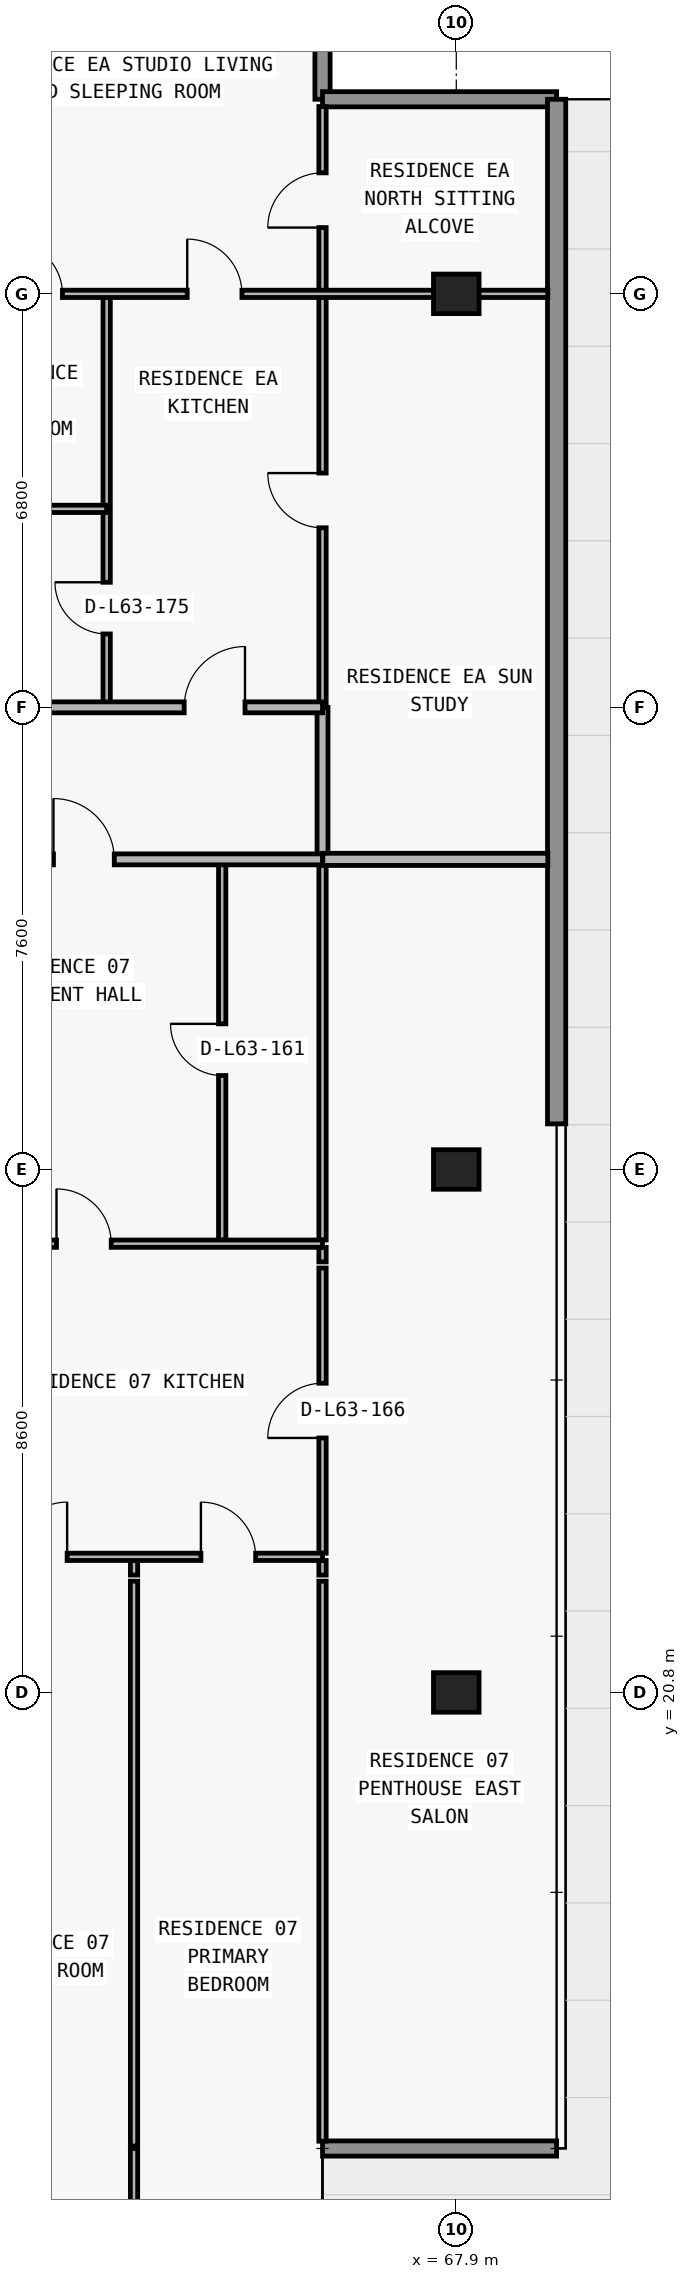
"""IFC4 building model, lengths in metres.
Left out: names, types, materials, properties, quantities, classifications, styles, units other than length and angle.
Written with IfcOpenShell. Run it as: python <this file> out.ifc"""

import sys

from ifc_helpers import new_model, si_unit, direction, frame, frame_2d, origin, origin_2d, place, context, subcontext, project, spatial, rectangle, extrude, element, fill, save


model = new_model("IFC4")
c1 = context("Model", 3, precision=1e-05, world=origin(), true_north=direction((0.0, 1.0)))
c2 = subcontext(c1, "Body", "Model", "MODEL_VIEW")
j1 = project(units=[si_unit("LENGTHUNIT", "METRE"), si_unit("PLANEANGLEUNIT", "RADIAN")], contexts=[c1])
p1 = place(None, origin())
s1 = spatial("IfcSite", under=j1, at=p1, CompositionType="ELEMENT")
p2 = place(p1, origin())
s2 = spatial("IfcBuilding", under=s1, at=p2, CompositionType="ELEMENT")
p3 = place(p2, frame((0.0, 0.0, 226.5)))
s3 = spatial("IfcBuildingStorey", under=s2, at=p3, CompositionType="ELEMENT", Elevation=226.5)
for number, where, z_axis, x_axis in (
    (1, (67.9, 20.8, 0.0), (0.0, 0.0, 1.0), (1.0, 0.0, 0.0)),
    (2, (67.9, 29.4, 0.0), (0.0, 0.0, 1.0), (1.0, 0.0, 0.0)),
    (3, (67.9, 43.8, 0.0), (0.0, 0.0, 1.0), (1.0, 0.0, 0.0)),
):
    element("IfcColumn", number, at=place(p3, frame(where, z_axis=z_axis, x_axis=x_axis)), inside=s3, PredefinedType="COLUMN", context=c2, shape_type="SweptSolid", body=[
        extrude(rectangle(XDim=0.75, YDim=0.65, at=origin_2d()), origin(), (0.0, 0.0, 1.0), 3.05),
    ])
p4 = place(p3, frame((65.7, 13.3, 0.0), z_axis=(0.0, 0.0, 1.0), x_axis=(1.0, 0.0, 0.0)))
e4 = element("IfcWall", 4, at=p4, inside=s3, PredefinedType="ELEMENTEDWALL", context=c2, shape_type="SweptSolid", body=[
    extrude(rectangle(XDim=3.85, YDim=0.25, at=frame_2d((1.925, 0.0))), origin(), (0.0, 0.0, 1.0), 3.05),
])
p5 = place(p3, frame((65.7, 50.45, 0.0), z_axis=(0.0, 0.0, 1.0), x_axis=(0.0, -1.0, 0.0)))
e5 = element("IfcWall", 5, at=p5, inside=s3, PredefinedType="ELEMENTEDWALL", context=c2, shape_type="SweptSolid", body=[
    extrude(rectangle(XDim=3.45, YDim=0.25, at=frame_2d((1.725, 0.0))), origin(), (0.0, 0.0, 1.0), 3.05),
])
p6 = place(p3, frame((65.7, 47.0, 0.0), z_axis=(0.0, 0.0, 1.0), x_axis=(1.0, 0.0, 0.0)))
e6 = element("IfcWall", 6, at=p6, inside=s3, PredefinedType="ELEMENTEDWALL", context=c2, shape_type="SweptSolid", body=[
    extrude(rectangle(XDim=3.85, YDim=0.25, at=frame_2d((1.925, 0.0))), origin(), (0.0, 0.0, 1.0), 3.05),
])
p7 = place(p3, frame((69.55, 47.0, 0.0), z_axis=(0.0, 0.0, 1.0), x_axis=(0.0, -1.0, 0.0)))
e7 = element("IfcWall", 7, at=p7, inside=s3, PredefinedType="STANDARD", context=c2, shape_type="SweptSolid", body=[
    extrude(rectangle(XDim=16.85, YDim=0.3, at=frame_2d((8.425, 0.0))), origin(), (0.0, 0.0, 1.0), 3.05),
])
p8 = place(p3, frame((62.15, 37.0, 0.0), z_axis=(0.0, 0.0, 1.0), x_axis=(0.0, 1.0, 0.0)))
e8 = element("IfcWall", 8, at=p8, inside=s3, PredefinedType="PARTITIONING", context=c2, shape_type="SweptSolid", body=[
    extrude(rectangle(XDim=6.8, YDim=0.12, at=frame_2d((3.4, 0.0))), origin(), (0.0, 0.0, 1.0), 3.05),
])
p9 = place(p8, frame((1.207, 0.0, 0.0)))
e9 = element("IfcOpeningElement", 9, at=p9, cuts=e8, PredefinedType="OPENING", context=c2, shape_type="SweptSolid", body=[
    extrude(rectangle(XDim=0.85, YDim=2.1, at=frame_2d((0.425, 1.05))), frame((0.0, 0.07, 0.0), z_axis=(0.0, -1.0, 0.0), x_axis=(1.0, 0.0, 0.0)), (0.0, 0.0, 1.0), 0.14),
])
p10 = place(p3, frame((62.6, 9.995, 0.0), z_axis=(0.0, 0.0, 1.0), x_axis=(0.0, 1.0, 0.0)))
e10 = element("IfcWall", 10, at=p10, inside=s3, PredefinedType="PARTITIONING", context=c2, shape_type="SweptSolid", body=[
    extrude(rectangle(XDim=3.305, YDim=0.12, at=frame_2d((1.652, 0.0))), origin(), (0.0, 0.0, 1.0), 3.05),
])
p11 = place(p3, frame((62.6, 13.34, 0.0), z_axis=(0.0, 0.0, 1.0), x_axis=(0.0, 1.0, 0.0)))
e11 = element("IfcWall", 11, at=p11, inside=s3, PredefinedType="PARTITIONING", context=c2, shape_type="SweptSolid", body=[
    extrude(rectangle(XDim=9.29, YDim=0.12, at=frame_2d((4.645, 0.0))), origin(), (0.0, 0.0, 1.0), 3.05),
])
p12 = place(p3, frame((62.6, 22.73, 0.0), z_axis=(0.0, 0.0, 1.0), x_axis=(0.0, 1.0, 0.0)))
e12 = element("IfcWall", 12, at=p12, inside=s3, PredefinedType="PARTITIONING", context=c2, shape_type="SweptSolid", body=[
    extrude(rectangle(XDim=0.24, YDim=0.12, at=frame_2d((0.12, 0.0))), origin(), (0.0, 0.0, 1.0), 3.05),
])
p13 = place(p3, frame((64.05, 28.24, 0.0), z_axis=(0.0, 0.0, 1.0), x_axis=(0.0, 1.0, 0.0)))
e13 = element("IfcWall", 13, at=p13, inside=s3, PredefinedType="PARTITIONING", context=c2, shape_type="SweptSolid", body=[
    extrude(rectangle(XDim=6.26, YDim=0.12, at=frame_2d((3.13, 0.0))), origin(), (0.0, 0.0, 1.0), 3.05),
])
p14 = place(p13, frame((2.705, 0.0, 0.0)))
e14 = element("IfcOpeningElement", 14, at=p14, cuts=e13, PredefinedType="OPENING", context=c2, shape_type="SweptSolid", body=[
    extrude(rectangle(XDim=0.85, YDim=2.1, at=frame_2d((0.425, 1.05))), frame((0.0, 0.07, 0.0), z_axis=(0.0, -1.0, 0.0), x_axis=(1.0, 0.0, 0.0)), (0.0, 0.0, 1.0), 0.14),
])
p15 = place(p3, frame((65.7, 13.42, 0.0), z_axis=(0.0, 0.0, 1.0), x_axis=(0.0, 1.0, 0.0)))
e15 = element("IfcWall", 15, at=p15, inside=s3, PredefinedType="PARTITIONING", context=c2, shape_type="SweptSolid", body=[
    extrude(rectangle(XDim=9.21, YDim=0.12, at=frame_2d((4.605, 0.0))), origin(), (0.0, 0.0, 1.0), 3.05),
])
p16 = place(p3, frame((65.7, 22.73, 0.0), z_axis=(0.0, 0.0, 1.0), x_axis=(0.0, 1.0, 0.0)))
e16 = element("IfcWall", 16, at=p16, inside=s3, PredefinedType="PARTITIONING", context=c2, shape_type="SweptSolid", body=[
    extrude(rectangle(XDim=0.24, YDim=0.12, at=frame_2d((0.12, 0.0))), origin(), (0.0, 0.0, 1.0), 3.05),
])
p17 = place(p3, frame((65.7, 23.09, 0.0), z_axis=(0.0, 0.0, 1.0), x_axis=(0.0, 1.0, 0.0)))
e17 = element("IfcWall", 17, at=p17, inside=s3, PredefinedType="PARTITIONING", context=c2, shape_type="SweptSolid", body=[
    extrude(rectangle(XDim=4.69, YDim=0.12, at=frame_2d((2.345, 0.0))), origin(), (0.0, 0.0, 1.0), 3.05),
])
p18 = place(p17, frame((1.895, 0.0, 0.0)))
e18 = element("IfcOpeningElement", 18, at=p18, cuts=e17, PredefinedType="OPENING", context=c2, shape_type="SweptSolid", body=[
    extrude(rectangle(XDim=0.9, YDim=2.15, at=frame_2d((0.45, 1.075))), frame((0.0, 0.07, 0.0), z_axis=(0.0, -1.0, 0.0), x_axis=(1.0, 0.0, 0.0)), (0.0, 0.0, 1.0), 0.14),
])
p19 = place(p3, frame((65.7, 27.88, 0.0), z_axis=(0.0, 0.0, 1.0), x_axis=(0.0, 1.0, 0.0)))
e19 = element("IfcWall", 19, at=p19, inside=s3, PredefinedType="PARTITIONING", context=c2, shape_type="SweptSolid", body=[
    extrude(rectangle(XDim=0.24, YDim=0.12, at=frame_2d((0.12, 0.0))), origin(), (0.0, 0.0, 1.0), 3.05),
])
p20 = place(p3, frame((65.7, 28.24, 0.0), z_axis=(0.0, 0.0, 1.0), x_axis=(0.0, 1.0, 0.0)))
e20 = element("IfcWall", 20, at=p20, inside=s3, PredefinedType="PARTITIONING", context=c2, shape_type="SweptSolid", body=[
    extrude(rectangle(XDim=6.26, YDim=0.12, at=frame_2d((3.13, 0.0))), origin(), (0.0, 0.0, 1.0), 3.05),
])
p21 = place(p3, frame((65.7, 34.505, 0.0), z_axis=(0.0, 0.0, 1.0), x_axis=(0.0, 1.0, 0.0)))
e21 = element("IfcWall", 21, at=p21, inside=s3, PredefinedType="PARTITIONING", context=c2, shape_type="SweptSolid", body=[
    extrude(rectangle(XDim=2.495, YDim=0.18, at=frame_2d((1.248, 0.0))), origin(), (0.0, 0.0, 1.0), 3.05),
])
p22 = place(p3, frame((65.7, 37.005, 0.0), z_axis=(0.0, 0.0, 1.0), x_axis=(0.0, 1.0, 0.0)))
e22 = element("IfcWall", 22, at=p22, inside=s3, PredefinedType="PARTITIONING", context=c2, shape_type="SweptSolid", body=[
    extrude(rectangle(XDim=9.875, YDim=0.12, at=frame_2d((4.938, 0.0))), origin(), (0.0, 0.0, 1.0), 3.05),
])
p23 = place(p22, frame((2.948, 0.0, 0.0)))
e23 = element("IfcOpeningElement", 23, at=p23, cuts=e22, PredefinedType="OPENING", context=c2, shape_type="SweptSolid", body=[
    extrude(rectangle(XDim=0.9, YDim=2.15, at=frame_2d((0.45, 1.075))), frame((0.0, 0.07, 0.0), z_axis=(0.0, -1.0, 0.0), x_axis=(1.0, 0.0, 0.0)), (0.0, 0.0, 1.0), 0.14),
])
p24 = place(p22, frame((7.885, 0.0, 0.0)))
e24 = element("IfcOpeningElement", 24, at=p24, cuts=e22, PredefinedType="OPENING", context=c2, shape_type="SweptSolid", body=[
    extrude(rectangle(XDim=0.9, YDim=2.15, at=frame_2d((0.45, 1.075))), frame((0.0, 0.07, 0.0), z_axis=(0.0, -1.0, 0.0), x_axis=(1.0, 0.0, 0.0)), (0.0, 0.0, 1.0), 0.14),
])
p25 = place(p3, frame((59.5, 23.03, 0.0), z_axis=(0.0, 0.0, 1.0), x_axis=(1.0, 0.0, 0.0)))
e25 = element("IfcWall", 25, at=p25, inside=s3, PredefinedType="PARTITIONING", context=c2, shape_type="SweptSolid", body=[
    extrude(rectangle(XDim=6.2, YDim=0.12, at=frame_2d((3.1, 0.0))), origin(), (0.0, 0.0, 1.0), 3.05),
])
p26 = place(p25, frame((1.1, 0.0, 0.0)))
e26 = element("IfcOpeningElement", 26, at=p26, cuts=e25, PredefinedType="OPENING", context=c2, shape_type="SweptSolid", body=[
    extrude(rectangle(XDim=0.9, YDim=2.15, at=frame_2d((0.45, 1.075))), frame((0.0, 0.07, 0.0), z_axis=(0.0, -1.0, 0.0), x_axis=(1.0, 0.0, 0.0)), (0.0, 0.0, 1.0), 0.14),
])
p27 = place(p25, frame((4.2, 0.0, 0.0)))
e27 = element("IfcOpeningElement", 27, at=p27, cuts=e25, PredefinedType="OPENING", context=c2, shape_type="SweptSolid", body=[
    extrude(rectangle(XDim=0.9, YDim=2.15, at=frame_2d((0.45, 1.075))), frame((0.0, 0.07, 0.0), z_axis=(0.0, -1.0, 0.0), x_axis=(1.0, 0.0, 0.0)), (0.0, 0.0, 1.0), 0.14),
])
p28 = place(p3, frame((59.5, 28.18, 0.0), z_axis=(0.0, 0.0, 1.0), x_axis=(1.0, 0.0, 0.0)))
e28 = element("IfcWall", 28, at=p28, inside=s3, PredefinedType="PARTITIONING", context=c2, shape_type="SweptSolid", body=[
    extrude(rectangle(XDim=6.2, YDim=0.12, at=frame_2d((3.1, 0.0))), origin(), (0.0, 0.0, 1.0), 3.05),
])
p29 = place(p28, frame((1.825, 0.0, 0.0)))
e29 = element("IfcOpeningElement", 29, at=p29, cuts=e28, PredefinedType="OPENING", context=c2, shape_type="SweptSolid", body=[
    extrude(rectangle(XDim=0.9, YDim=2.15, at=frame_2d((0.45, 1.075))), frame((0.0, 0.07, 0.0), z_axis=(0.0, -1.0, 0.0), x_axis=(1.0, 0.0, 0.0)), (0.0, 0.0, 1.0), 0.14),
])
p30 = place(p3, frame((39.28, 34.5, 0.0), z_axis=(0.0, 0.0, 1.0), x_axis=(1.0, 0.0, 0.0)))
e30 = element("IfcWall", 30, at=p30, inside=s3, PredefinedType="PARTITIONING", context=c2, shape_type="SweptSolid", body=[
    extrude(rectangle(XDim=26.42, YDim=0.18, at=frame_2d((13.21, 0.0))), origin(), (0.0, 0.0, 1.0), 3.05),
])
p31 = place(p30, frame((6.295, 0.0, 0.0)))
e31 = element("IfcOpeningElement", 31, at=p31, cuts=e30, PredefinedType="OPENING", context=c2, shape_type="SweptSolid", body=[
    extrude(rectangle(XDim=1.0, YDim=2.2, at=frame_2d((0.5, 1.1))), frame((0.0, 0.1, 0.0), z_axis=(0.0, -1.0, 0.0), x_axis=(1.0, 0.0, 0.0)), (0.0, 0.0, 1.0), 0.2),
])
p32 = place(p30, frame((14.695, 0.0, 0.0)))
e32 = element("IfcOpeningElement", 32, at=p32, cuts=e30, PredefinedType="OPENING", context=c2, shape_type="SweptSolid", body=[
    extrude(rectangle(XDim=1.0, YDim=2.2, at=frame_2d((0.5, 1.1))), frame((0.0, 0.1, 0.0), z_axis=(0.0, -1.0, 0.0), x_axis=(1.0, 0.0, 0.0)), (0.0, 0.0, 1.0), 0.2),
])
p33 = place(p30, frame((21.995, 0.0, 0.0)))
e33 = element("IfcOpeningElement", 33, at=p33, cuts=e30, PredefinedType="OPENING", context=c2, shape_type="SweptSolid", body=[
    extrude(rectangle(XDim=1.0, YDim=2.2, at=frame_2d((0.5, 1.1))), frame((0.0, 0.1, 0.0), z_axis=(0.0, -1.0, 0.0), x_axis=(1.0, 0.0, 0.0)), (0.0, 0.0, 1.0), 0.2),
])
p34 = place(p3, frame((65.705, 34.5, 0.0), z_axis=(0.0, 0.0, 1.0), x_axis=(1.0, 0.0, 0.0)))
e34 = element("IfcWall", 34, at=p34, inside=s3, PredefinedType="PARTITIONING", context=c2, shape_type="SweptSolid", body=[
    extrude(rectangle(XDim=3.7, YDim=0.2, at=frame_2d((1.85, 0.0))), origin(), (0.0, 0.0, 1.0), 3.05),
])
p35 = place(p3, frame((59.855, 37.0, 0.0), z_axis=(0.0, 0.0, 1.0), x_axis=(1.0, 0.0, 0.0)))
e35 = element("IfcWall", 35, at=p35, inside=s3, PredefinedType="PARTITIONING", context=c2, shape_type="SweptSolid", body=[
    extrude(rectangle(XDim=5.845, YDim=0.18, at=frame_2d((2.922, 0.0))), origin(), (0.0, 0.0, 1.0), 3.05),
])
p36 = place(p35, frame((3.57, 0.0, 0.0)))
e36 = element("IfcOpeningElement", 36, at=p36, cuts=e35, PredefinedType="OPENING", context=c2, shape_type="SweptSolid", body=[
    extrude(rectangle(XDim=1.0, YDim=2.2, at=frame_2d((0.5, 1.1))), frame((0.0, 0.1, 0.0), z_axis=(0.0, -1.0, 0.0), x_axis=(1.0, 0.0, 0.0)), (0.0, 0.0, 1.0), 0.2),
])
p37 = place(p3, frame((59.845, 40.264, 0.0), z_axis=(0.0, 0.0, 1.0), x_axis=(1.0, 0.0, 0.0)))
e37 = element("IfcWall", 37, at=p37, inside=s3, PredefinedType="PARTITIONING", context=c2, shape_type="SweptSolid", body=[
    extrude(rectangle(XDim=2.305, YDim=0.12, at=frame_2d((1.152, 0.0))), origin(), (0.0, 0.0, 1.0), 3.05),
])
p38 = place(p3, frame((59.845, 43.8, 0.0), z_axis=(0.0, 0.0, 1.0), x_axis=(1.0, 0.0, 0.0)))
e38 = element("IfcWall", 38, at=p38, inside=s3, PredefinedType="PARTITIONING", context=c2, shape_type="SweptSolid", body=[
    extrude(rectangle(XDim=9.56, YDim=0.12, at=frame_2d((4.78, 0.0))), origin(), (0.0, 0.0, 1.0), 2.418),
])
p39 = place(p38, frame((3.63, 0.0, 0.0)))
e39 = element("IfcOpeningElement", 39, at=p39, cuts=e38, PredefinedType="OPENING", context=c2, shape_type="SweptSolid", body=[
    extrude(rectangle(XDim=0.9, YDim=2.15, at=frame_2d((0.45, 1.075))), frame((0.0, 0.07, 0.0), z_axis=(0.0, -1.0, 0.0), x_axis=(1.0, 0.0, 0.0)), (0.0, 0.0, 1.0), 0.14),
])
p40 = place(p38, frame((0.728, 0.0, 0.0)))
e40 = element("IfcOpeningElement", 40, at=p40, cuts=e38, PredefinedType="OPENING", context=c2, shape_type="SweptSolid", body=[
    extrude(rectangle(XDim=0.85, YDim=2.1, at=frame_2d((0.425, 1.05))), frame((0.0, 0.07, 0.0), z_axis=(0.0, -1.0, 0.0), x_axis=(1.0, 0.0, 0.0)), (0.0, 0.0, 1.0), 0.14),
])
p41 = place(p33, origin())
e41 = element("IfcDoor", 41, at=p41, inside=s3, OperationType="SINGLE_SWING_LEFT", PredefinedType="DOOR", context=c2, shape_type="SweptSolid", body=[
    extrude(rectangle(XDim=1.0, YDim=2.2, at=frame_2d((0.5, 1.1))), frame((0.0, 0.025, 0.0), z_axis=(0.0, -1.0, 0.0), x_axis=(1.0, 0.0, 0.0)), (0.0, 0.0, 1.0), 0.05),
])
fill(e33, e41)
p42 = place(p14, origin())
e42 = element("IfcDoor", 42, at=p42, inside=s3, OperationType="SINGLE_SWING_RIGHT", PredefinedType="DOOR", context=c2, shape_type="SweptSolid", body=[
    extrude(rectangle(XDim=0.85, YDim=2.1, at=frame_2d((0.425, 1.05))), frame((0.0, 0.025, 0.0), z_axis=(0.0, -1.0, 0.0), x_axis=(1.0, 0.0, 0.0)), (0.0, 0.0, 1.0), 0.05),
])
fill(e14, e42)
p43 = place(p29, origin())
e43 = element("IfcDoor", 43, at=p43, inside=s3, OperationType="SINGLE_SWING_LEFT", PredefinedType="DOOR", context=c2, shape_type="SweptSolid", body=[
    extrude(rectangle(XDim=0.9, YDim=2.15, at=frame_2d((0.45, 1.075))), frame((0.0, 0.025, 0.0), z_axis=(0.0, -1.0, 0.0), x_axis=(1.0, 0.0, 0.0)), (0.0, 0.0, 1.0), 0.05),
])
fill(e29, e43)
p44 = place(p26, origin())
e44 = element("IfcDoor", 44, at=p44, inside=s3, OperationType="SINGLE_SWING_RIGHT", PredefinedType="DOOR", context=c2, shape_type="SweptSolid", body=[
    extrude(rectangle(XDim=0.9, YDim=2.15, at=frame_2d((0.45, 1.075))), frame((0.0, 0.025, 0.0), z_axis=(0.0, -1.0, 0.0), x_axis=(1.0, 0.0, 0.0)), (0.0, 0.0, 1.0), 0.05),
])
fill(e26, e44)
p45 = place(p27, origin())
e45 = element("IfcDoor", 45, at=p45, inside=s3, OperationType="SINGLE_SWING_LEFT", PredefinedType="DOOR", context=c2, shape_type="SweptSolid", body=[
    extrude(rectangle(XDim=0.9, YDim=2.15, at=frame_2d((0.45, 1.075))), frame((0.0, 0.025, 0.0), z_axis=(0.0, -1.0, 0.0), x_axis=(1.0, 0.0, 0.0)), (0.0, 0.0, 1.0), 0.05),
])
fill(e27, e45)
p46 = place(p18, origin())
e46 = element("IfcDoor", 46, at=p46, inside=s3, OperationType="SINGLE_SWING_LEFT", PredefinedType="DOOR", context=c2, shape_type="SweptSolid", body=[
    extrude(rectangle(XDim=0.9, YDim=2.15, at=frame_2d((0.45, 1.075))), frame((0.0, 0.025, 0.0), z_axis=(0.0, -1.0, 0.0), x_axis=(1.0, 0.0, 0.0)), (0.0, 0.0, 1.0), 0.05),
])
fill(e18, e46)
p47 = place(p36, origin())
e47 = element("IfcDoor", 47, at=p47, inside=s3, OperationType="SINGLE_SWING_RIGHT", PredefinedType="DOOR", context=c2, shape_type="SweptSolid", body=[
    extrude(rectangle(XDim=1.0, YDim=2.2, at=frame_2d((0.5, 1.1))), frame((0.0, 0.025, 0.0), z_axis=(0.0, -1.0, 0.0), x_axis=(1.0, 0.0, 0.0)), (0.0, 0.0, 1.0), 0.05),
])
fill(e36, e47)
p48 = place(p39, origin())
e48 = element("IfcDoor", 48, at=p48, inside=s3, OperationType="SINGLE_SWING_LEFT", PredefinedType="DOOR", context=c2, shape_type="SweptSolid", body=[
    extrude(rectangle(XDim=0.9, YDim=2.15, at=frame_2d((0.45, 1.075))), frame((0.0, 0.025, 0.0), z_axis=(0.0, -1.0, 0.0), x_axis=(1.0, 0.0, 0.0)), (0.0, 0.0, 1.0), 0.05),
])
fill(e39, e48)
p49 = place(p9, origin())
e49 = element("IfcDoor", 49, at=p49, inside=s3, OperationType="SINGLE_SWING_RIGHT", PredefinedType="DOOR", context=c2, shape_type="SweptSolid", body=[
    extrude(rectangle(XDim=0.85, YDim=2.1, at=frame_2d((0.425, 1.05))), frame((0.0, 0.025, 0.0), z_axis=(0.0, -1.0, 0.0), x_axis=(1.0, 0.0, 0.0)), (0.0, 0.0, 1.0), 0.05),
])
fill(e9, e49)
p50 = place(p40, origin())
e50 = element("IfcDoor", 50, at=p50, inside=s3, OperationType="SINGLE_SWING_LEFT", PredefinedType="DOOR", context=c2, shape_type="SweptSolid", body=[
    extrude(rectangle(XDim=0.85, YDim=2.1, at=frame_2d((0.425, 1.05))), frame((0.0, 0.025, 0.0), z_axis=(0.0, -1.0, 0.0), x_axis=(1.0, 0.0, 0.0)), (0.0, 0.0, 1.0), 0.05),
])
fill(e40, e50)
p51 = place(p23, origin())
e51 = element("IfcDoor", 51, at=p51, inside=s3, OperationType="SINGLE_SWING_RIGHT", PredefinedType="DOOR", context=c2, shape_type="SweptSolid", body=[
    extrude(rectangle(XDim=0.9, YDim=2.15, at=frame_2d((0.45, 1.075))), frame((0.0, 0.025, 0.0), z_axis=(0.0, -1.0, 0.0), x_axis=(1.0, 0.0, 0.0)), (0.0, 0.0, 1.0), 0.05),
])
fill(e23, e51)
p52 = place(p24, origin())
e52 = element("IfcDoor", 52, at=p52, inside=s3, OperationType="SINGLE_SWING_LEFT", PredefinedType="DOOR", context=c2, shape_type="SweptSolid", body=[
    extrude(rectangle(XDim=0.9, YDim=2.15, at=frame_2d((0.45, 1.075))), frame((0.0, 0.025, 0.0), z_axis=(0.0, -1.0, 0.0), x_axis=(1.0, 0.0, 0.0)), (0.0, 0.0, 1.0), 0.05),
])
fill(e24, e52)
save(model, sys.argv[1])
